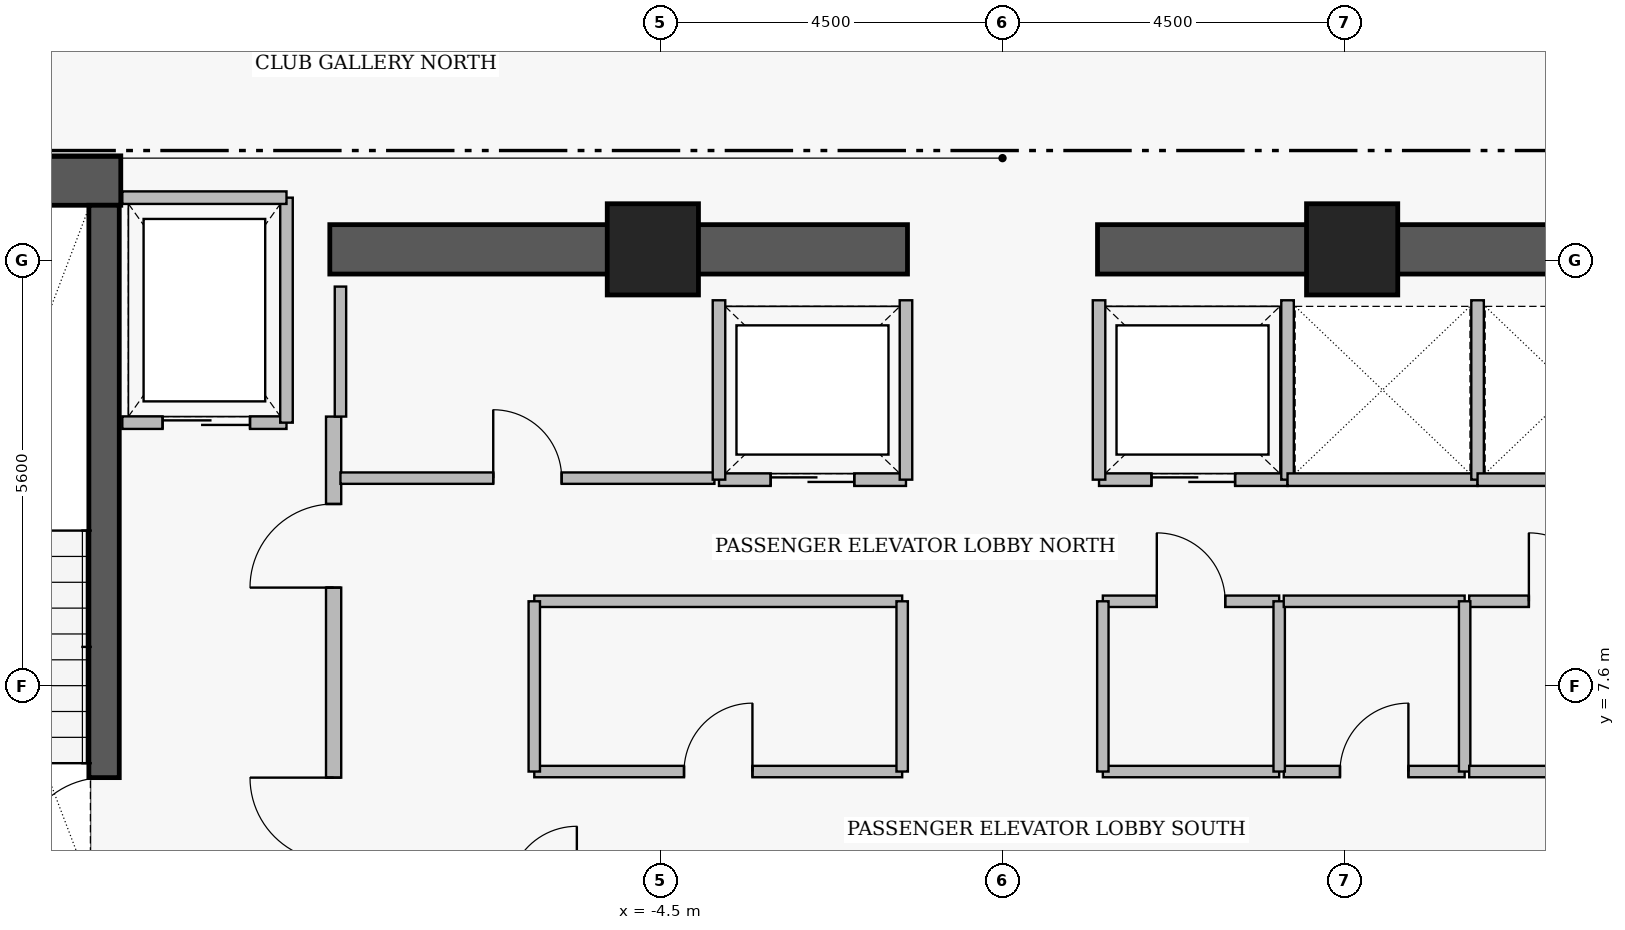
"""IFC4 building model, lengths in metres.
Left out: names, types, materials, properties, quantities, classifications, styles, units other than length and angle.
Written with IfcOpenShell. Run it as: python <this file> out.ifc"""

import sys

from ifc_helpers import new_model, si_unit, direction, frame, frame_2d, origin, origin_2d, place, context, subcontext, project, spatial, rectangle, extrude, element, fill, save


model = new_model("IFC4")
c1 = context("Model", 3, precision=1e-05, world=origin(), true_north=direction((0.0, 1.0)))
c2 = subcontext(c1, "Body", "Model", "MODEL_VIEW")
j1 = project(units=[si_unit("LENGTHUNIT", "METRE"), si_unit("PLANEANGLEUNIT", "RADIAN")], contexts=[c1])
p1 = place(None, origin())
s1 = spatial("IfcSite", under=j1, at=p1, CompositionType="ELEMENT")
p2 = place(p1, origin())
s2 = spatial("IfcBuilding", under=s1, at=p2, CompositionType="ELEMENT")
p3 = place(p2, frame((0.0, 0.0, 222.4)))
s3 = spatial("IfcBuildingStorey", under=s2, at=p3, CompositionType="ELEMENT", Elevation=222.4)
p4 = place(p3, frame((-16.06, 14.255, 0.0), z_axis=(0.0, 0.0, 1.0), x_axis=(1.0, 0.0, 0.0)))
e1 = element("IfcWall", 1, at=p4, inside=s3, PredefinedType="SHEAR", context=c2, shape_type="SweptSolid", body=[
    extrude(rectangle(XDim=4.46, YDim=0.65, at=frame_2d((2.23, 0.0))), origin(), (0.0, 0.0, 1.0), 3.56),
])
for number, where, z_axis, x_axis in (
    (2, (-8.85, 13.35, 0.0), (0.0, 0.0, 1.0), (1.0, 0.0, 0.0)),
    (3, (1.25, 13.35, 0.0), (0.0, 0.0, 1.0), (1.0, 0.0, 0.0)),
):
    element("IfcWall", number, at=place(p3, frame(where, z_axis=z_axis, x_axis=x_axis)), inside=s3, PredefinedType="SHEAR", context=c2, shape_type="SweptSolid", body=[
        extrude(rectangle(XDim=7.6, YDim=0.65, at=frame_2d((3.8, 0.0))), origin(), (0.0, 0.0, 1.0), 3.53),
    ])
p5 = place(p3, frame((-11.82, 4.97, 0.0), z_axis=(0.0, 0.0, 1.0), x_axis=(0.0, 1.0, 0.0)))
e4 = element("IfcWall", 4, at=p5, inside=s3, PredefinedType="SHEAR", context=c2, shape_type="SweptSolid", body=[
    extrude(rectangle(XDim=8.96, YDim=0.4, at=frame_2d((4.48, 0.0))), origin(), (0.0, 0.0, 1.0), 3.56),
])
p6 = place(p5, frame((0.31, 0.0, 0.0)))
e5 = element("IfcOpeningElement", 5, at=p6, cuts=e4, PredefinedType="OPENING", context=c2, shape_type="SweptSolid", body=[
    extrude(rectangle(XDim=1.12, YDim=2.22, at=frame_2d((0.56, 1.11))), frame((0.0, 0.21, 0.0), z_axis=(0.0, -1.0, 0.0), x_axis=(1.0, 0.0, 0.0)), (0.0, 0.0, 1.0), 0.42),
])
for number, where, z_axis, x_axis in (
    (6, (-4.6, 13.35, 0.0), (0.0, 0.0, 1.0), (1.0, 0.0, 0.0)),
    (7, (4.6, 13.35, 0.0), (0.0, 0.0, 1.0), (1.0, 0.0, 0.0)),
):
    element("IfcColumn", number, at=place(p3, frame(where, z_axis=z_axis, x_axis=x_axis)), inside=s3, PredefinedType="COLUMN", context=c2, shape_type="SweptSolid", body=[
        extrude(rectangle(XDim=1.2, YDim=1.2, at=origin_2d()), origin(), (0.0, 0.0, 1.0), 3.75),
    ])
p7 = place(p3, frame((-8.8, 5.05, 0.0), z_axis=(0.0, 0.0, 1.0), x_axis=(0.0, 1.0, 0.0)))
e8 = element("IfcWall", 8, at=p7, inside=s3, PredefinedType="PARTITIONING", context=c2, shape_type="SweptSolid", body=[
    extrude(rectangle(XDim=6.1, YDim=0.2, at=frame_2d((3.05, 0.0))), origin(), (0.0, 0.0, 1.0), 3.53),
])
p8 = place(p7, frame((0.25, 0.0, 0.0)))
e9 = element("IfcOpeningElement", 9, at=p8, cuts=e8, PredefinedType="OPENING", context=c2, shape_type="SweptSolid", body=[
    extrude(rectangle(XDim=1.1, YDim=2.2, at=frame_2d((0.55, 1.1))), frame((0.0, 0.11, 0.0), z_axis=(0.0, -1.0, 0.0), x_axis=(1.0, 0.0, 0.0)), (0.0, 0.0, 1.0), 0.22),
])
p9 = place(p7, frame((3.85, 0.0, 0.0)))
e10 = element("IfcOpeningElement", 10, at=p9, cuts=e8, PredefinedType="OPENING", context=c2, shape_type="SweptSolid", body=[
    extrude(rectangle(XDim=1.1, YDim=2.2, at=frame_2d((0.55, 1.1))), frame((0.0, 0.11, 0.0), z_axis=(0.0, -1.0, 0.0), x_axis=(1.0, 0.0, 0.0)), (0.0, 0.0, 1.0), 0.22),
])
p10 = place(p3, frame((-11.58, 11.07, 0.0), z_axis=(0.0, 0.0, 1.0), x_axis=(1.0, 0.0, 0.0)))
e11 = element("IfcWall", 11, at=p10, inside=s3, PredefinedType="PARTITIONING", context=c2, shape_type="SweptSolid", body=[
    extrude(rectangle(XDim=2.16, YDim=0.165, at=frame_2d((1.08, 0.0))), origin(), (0.0, 0.0, 1.0), 3.53),
])
p11 = place(p10, frame((0.53, 0.0, 0.0)))
e12 = element("IfcOpeningElement", 12, at=p11, cuts=e11, PredefinedType="OPENING", context=c2, shape_type="SweptSolid", body=[
    extrude(rectangle(XDim=1.15, YDim=2.25, at=frame_2d((0.575, 1.125))), frame((0.0, 0.093, 0.0), z_axis=(0.0, -1.0, 0.0), x_axis=(1.0, 0.0, 0.0)), (0.0, 0.0, 1.0), 0.185),
])
p12 = place(p3, frame((-3.73, 10.32, 0.0), z_axis=(0.0, 0.0, 1.0), x_axis=(1.0, 0.0, 0.0)))
e13 = element("IfcWall", 13, at=p12, inside=s3, PredefinedType="PARTITIONING", context=c2, shape_type="SweptSolid", body=[
    extrude(rectangle(XDim=2.46, YDim=0.165, at=frame_2d((1.23, 0.0))), origin(), (0.0, 0.0, 1.0), 3.53),
])
p13 = place(p12, frame((0.68, 0.0, 0.0)))
e14 = element("IfcOpeningElement", 14, at=p13, cuts=e13, PredefinedType="OPENING", context=c2, shape_type="SweptSolid", body=[
    extrude(rectangle(XDim=1.1, YDim=2.25, at=frame_2d((0.55, 1.125))), frame((0.0, 0.093, 0.0), z_axis=(0.0, -1.0, 0.0), x_axis=(1.0, 0.0, 0.0)), (0.0, 0.0, 1.0), 0.185),
])
p14 = place(p3, frame((1.27, 10.32, 0.0), z_axis=(0.0, 0.0, 1.0), x_axis=(1.0, 0.0, 0.0)))
e15 = element("IfcWall", 15, at=p14, inside=s3, PredefinedType="PARTITIONING", context=c2, shape_type="SweptSolid", body=[
    extrude(rectangle(XDim=2.48, YDim=0.165, at=frame_2d((1.24, 0.0))), origin(), (0.0, 0.0, 1.0), 3.53),
])
p15 = place(p14, frame((0.69, 0.0, 0.0)))
e16 = element("IfcOpeningElement", 16, at=p15, cuts=e15, PredefinedType="OPENING", context=c2, shape_type="SweptSolid", body=[
    extrude(rectangle(XDim=1.1, YDim=2.25, at=frame_2d((0.55, 1.125))), frame((0.0, 0.093, 0.0), z_axis=(0.0, -1.0, 0.0), x_axis=(1.0, 0.0, 0.0)), (0.0, 0.0, 1.0), 0.185),
])
p16 = place(p3, frame((-8.71, 10.34, 0.0), z_axis=(0.0, 0.0, 1.0), x_axis=(1.0, 0.0, 0.0)))
e17 = element("IfcWall", 17, at=p16, inside=s3, PredefinedType="PARTITIONING", context=c2, shape_type="SweptSolid", body=[
    extrude(rectangle(XDim=4.92, YDim=0.15, at=frame_2d((2.46, 0.0))), origin(), (0.0, 0.0, 1.0), 3.53),
])
p17 = place(p16, frame((2.01, 0.0, 0.0)))
e18 = element("IfcOpeningElement", 18, at=p17, cuts=e17, PredefinedType="OPENING", context=c2, shape_type="SweptSolid", body=[
    extrude(rectangle(XDim=0.9, YDim=2.15, at=frame_2d((0.45, 1.075))), frame((0.0, 0.085, 0.0), z_axis=(0.0, -1.0, 0.0), x_axis=(1.0, 0.0, 0.0)), (0.0, 0.0, 1.0), 0.17),
])
p18 = place(p3, frame((-6.16, 6.48, 0.0), z_axis=(0.0, 0.0, 1.0), x_axis=(1.0, 0.0, 0.0)))
e19 = element("IfcWall", 19, at=p18, inside=s3, PredefinedType="PARTITIONING", context=c2, shape_type="SweptSolid", body=[
    extrude(rectangle(XDim=4.84, YDim=0.15, at=frame_2d((2.42, 0.0))), origin(), (0.0, 0.0, 1.0), 3.53),
])
p19 = place(p18, frame((1.97, 0.0, 0.0)))
e20 = element("IfcOpeningElement", 20, at=p19, cuts=e19, PredefinedType="OPENING", context=c2, shape_type="SweptSolid", body=[
    extrude(rectangle(XDim=0.9, YDim=2.15, at=frame_2d((0.45, 1.075))), frame((0.0, 0.085, 0.0), z_axis=(0.0, -1.0, 0.0), x_axis=(1.0, 0.0, 0.0)), (0.0, 0.0, 1.0), 0.17),
])
p20 = place(p3, frame((1.32, 8.72, 0.0), z_axis=(0.0, 0.0, 1.0), x_axis=(1.0, 0.0, 0.0)))
e21 = element("IfcWall", 21, at=p20, inside=s3, PredefinedType="PARTITIONING", context=c2, shape_type="SweptSolid", body=[
    extrude(rectangle(XDim=2.32, YDim=0.15, at=frame_2d((1.16, 0.0))), origin(), (0.0, 0.0, 1.0), 3.53),
])
p21 = place(p20, frame((0.71, 0.0, 0.0)))
e22 = element("IfcOpeningElement", 22, at=p21, cuts=e21, PredefinedType="OPENING", context=c2, shape_type="SweptSolid", body=[
    extrude(rectangle(XDim=0.9, YDim=2.15, at=frame_2d((0.45, 1.075))), frame((0.0, 0.085, 0.0), z_axis=(0.0, -1.0, 0.0), x_axis=(1.0, 0.0, 0.0)), (0.0, 0.0, 1.0), 0.17),
])
p22 = place(p3, frame((3.7, 6.48, 0.0), z_axis=(0.0, 0.0, 1.0), x_axis=(1.0, 0.0, 0.0)))
e23 = element("IfcWall", 23, at=p22, inside=s3, PredefinedType="PARTITIONING", context=c2, shape_type="SweptSolid", body=[
    extrude(rectangle(XDim=2.38, YDim=0.15, at=frame_2d((1.19, 0.0))), origin(), (0.0, 0.0, 1.0), 3.53),
])
p23 = place(p22, frame((0.74, 0.0, 0.0)))
e24 = element("IfcOpeningElement", 24, at=p23, cuts=e23, PredefinedType="OPENING", context=c2, shape_type="SweptSolid", body=[
    extrude(rectangle(XDim=0.9, YDim=2.15, at=frame_2d((0.45, 1.075))), frame((0.0, 0.085, 0.0), z_axis=(0.0, -1.0, 0.0), x_axis=(1.0, 0.0, 0.0)), (0.0, 0.0, 1.0), 0.17),
])
p24 = place(p3, frame((6.14, 8.72, 0.0), z_axis=(0.0, 0.0, 1.0), x_axis=(1.0, 0.0, 0.0)))
e25 = element("IfcWall", 25, at=p24, inside=s3, PredefinedType="PARTITIONING", context=c2, shape_type="SweptSolid", body=[
    extrude(rectangle(XDim=2.47, YDim=0.15, at=frame_2d((1.235, 0.0))), origin(), (0.0, 0.0, 1.0), 3.53),
])
p25 = place(p24, frame((0.785, 0.0, 0.0)))
e26 = element("IfcOpeningElement", 26, at=p25, cuts=e25, PredefinedType="OPENING", context=c2, shape_type="SweptSolid", body=[
    extrude(rectangle(XDim=0.9, YDim=2.15, at=frame_2d((0.45, 1.075))), frame((0.0, 0.085, 0.0), z_axis=(0.0, -1.0, 0.0), x_axis=(1.0, 0.0, 0.0)), (0.0, 0.0, 1.0), 0.17),
])
p26 = place(p3, frame((-9.42, 11.07, 0.0), z_axis=(0.0, 0.0, 1.0), x_axis=(0.0, 1.0, 0.0)))
e27 = element("IfcWall", 27, at=p26, inside=s3, PredefinedType="PARTITIONING", context=c2, shape_type="SweptSolid", body=[
    extrude(rectangle(XDim=2.96, YDim=0.165, at=frame_2d((1.48, 0.0))), origin(), (0.0, 0.0, 1.0), 3.53),
])
p27 = place(p3, frame((-11.58, 14.03, 0.0), z_axis=(0.0, 0.0, 1.0), x_axis=(1.0, 0.0, 0.0)))
e28 = element("IfcWall", 28, at=p27, inside=s3, PredefinedType="PARTITIONING", context=c2, shape_type="SweptSolid", body=[
    extrude(rectangle(XDim=2.16, YDim=0.165, at=frame_2d((1.08, 0.0))), origin(), (0.0, 0.0, 1.0), 3.53),
])
for number, where, z_axis, x_axis in (
    (29, (-3.73, 10.32, 0.0), (0.0, 0.0, 1.0), (0.0, 1.0, 0.0)),
    (30, (-1.27, 10.32, 0.0), (0.0, 0.0, 1.0), (0.0, 1.0, 0.0)),
    (31, (1.27, 10.32, 0.0), (0.0, 0.0, 1.0), (0.0, 1.0, 0.0)),
    (32, (3.75, 10.32, 0.0), (0.0, 0.0, 1.0), (0.0, 1.0, 0.0)),
):
    element("IfcWall", number, at=place(p3, frame(where, z_axis=z_axis, x_axis=x_axis)), inside=s3, PredefinedType="PARTITIONING", context=c2, shape_type="SweptSolid", body=[
        extrude(rectangle(XDim=2.36, YDim=0.165, at=frame_2d((1.18, 0.0))), origin(), (0.0, 0.0, 1.0), 3.53),
    ])
p28 = place(p3, frame((3.75, 10.32, 0.0), z_axis=(0.0, 0.0, 1.0), x_axis=(1.0, 0.0, 0.0)))
e33 = element("IfcWall", 33, at=p28, inside=s3, PredefinedType="PARTITIONING", context=c2, shape_type="SweptSolid", body=[
    extrude(rectangle(XDim=2.5, YDim=0.165, at=frame_2d((1.25, 0.0))), origin(), (0.0, 0.0, 1.0), 3.53),
])
p29 = place(p3, frame((6.25, 10.32, 0.0), z_axis=(0.0, 0.0, 1.0), x_axis=(0.0, 1.0, 0.0)))
e34 = element("IfcWall", 34, at=p29, inside=s3, PredefinedType="PARTITIONING", context=c2, shape_type="SweptSolid", body=[
    extrude(rectangle(XDim=2.36, YDim=0.165, at=frame_2d((1.18, 0.0))), origin(), (0.0, 0.0, 1.0), 3.53),
])
p30 = place(p3, frame((6.25, 10.32, 0.0), z_axis=(0.0, 0.0, 1.0), x_axis=(1.0, 0.0, 0.0)))
e35 = element("IfcWall", 35, at=p30, inside=s3, PredefinedType="PARTITIONING", context=c2, shape_type="SweptSolid", body=[
    extrude(rectangle(XDim=2.48, YDim=0.165, at=frame_2d((1.24, 0.0))), origin(), (0.0, 0.0, 1.0), 3.53),
])
p31 = place(p3, frame((-8.71, 11.15, 0.0), z_axis=(0.0, 0.0, 1.0), x_axis=(0.0, 1.0, 0.0)))
e36 = element("IfcWall", 36, at=p31, inside=s3, PredefinedType="PARTITIONING", context=c2, shape_type="SweptSolid", body=[
    extrude(rectangle(XDim=1.71, YDim=0.15, at=frame_2d((0.855, 0.0))), origin(), (0.0, 0.0, 1.0), 3.53),
])
p32 = place(p3, frame((-6.16, 8.72, 0.0), z_axis=(0.0, 0.0, 1.0), x_axis=(1.0, 0.0, 0.0)))
e37 = element("IfcWall", 37, at=p32, inside=s3, PredefinedType="PARTITIONING", context=c2, shape_type="SweptSolid", body=[
    extrude(rectangle(XDim=4.84, YDim=0.15, at=frame_2d((2.42, 0.0))), origin(), (0.0, 0.0, 1.0), 3.53),
])
for number, where, z_axis, x_axis in (
    (38, (-6.16, 6.48, 0.0), (0.0, 0.0, 1.0), (0.0, 1.0, 0.0)),
    (39, (-1.32, 6.48, 0.0), (0.0, 0.0, 1.0), (0.0, 1.0, 0.0)),
):
    element("IfcWall", number, at=place(p3, frame(where, z_axis=z_axis, x_axis=x_axis)), inside=s3, PredefinedType="PARTITIONING", context=c2, shape_type="SweptSolid", body=[
        extrude(rectangle(XDim=2.24, YDim=0.15, at=frame_2d((1.12, 0.0))), origin(), (0.0, 0.0, 1.0), 3.53),
    ])
p33 = place(p3, frame((1.32, 6.48, 0.0), z_axis=(0.0, 0.0, 1.0), x_axis=(1.0, 0.0, 0.0)))
e40 = element("IfcWall", 40, at=p33, inside=s3, PredefinedType="PARTITIONING", context=c2, shape_type="SweptSolid", body=[
    extrude(rectangle(XDim=2.32, YDim=0.15, at=frame_2d((1.16, 0.0))), origin(), (0.0, 0.0, 1.0), 3.53),
])
for number, where, z_axis, x_axis in (
    (41, (1.32, 6.48, 0.0), (0.0, 0.0, 1.0), (0.0, 1.0, 0.0)),
    (42, (3.64, 6.48, 0.0), (0.0, 0.0, 1.0), (0.0, 1.0, 0.0)),
):
    element("IfcWall", number, at=place(p3, frame(where, z_axis=z_axis, x_axis=x_axis)), inside=s3, PredefinedType="PARTITIONING", context=c2, shape_type="SweptSolid", body=[
        extrude(rectangle(XDim=2.24, YDim=0.15, at=frame_2d((1.12, 0.0))), origin(), (0.0, 0.0, 1.0), 3.53),
    ])
p34 = place(p3, frame((3.7, 8.72, 0.0), z_axis=(0.0, 0.0, 1.0), x_axis=(1.0, 0.0, 0.0)))
e43 = element("IfcWall", 43, at=p34, inside=s3, PredefinedType="PARTITIONING", context=c2, shape_type="SweptSolid", body=[
    extrude(rectangle(XDim=2.38, YDim=0.15, at=frame_2d((1.19, 0.0))), origin(), (0.0, 0.0, 1.0), 3.53),
])
p35 = place(p3, frame((6.08, 6.48, 0.0), z_axis=(0.0, 0.0, 1.0), x_axis=(0.0, 1.0, 0.0)))
e44 = element("IfcWall", 44, at=p35, inside=s3, PredefinedType="PARTITIONING", context=c2, shape_type="SweptSolid", body=[
    extrude(rectangle(XDim=2.24, YDim=0.15, at=frame_2d((1.12, 0.0))), origin(), (0.0, 0.0, 1.0), 3.53),
])
p36 = place(p3, frame((6.14, 6.48, 0.0), z_axis=(0.0, 0.0, 1.0), x_axis=(1.0, 0.0, 0.0)))
e45 = element("IfcWall", 45, at=p36, inside=s3, PredefinedType="PARTITIONING", context=c2, shape_type="SweptSolid", body=[
    extrude(rectangle(XDim=2.47, YDim=0.15, at=frame_2d((1.235, 0.0))), origin(), (0.0, 0.0, 1.0), 3.53),
])
p37 = place(p6, origin())
e46 = element("IfcDoor", 46, at=p37, inside=s3, OperationType="SINGLE_SWING_LEFT", PredefinedType="DOOR", context=c2, shape_type="SweptSolid", body=[
    extrude(rectangle(XDim=1.12, YDim=2.22, at=frame_2d((0.56, 1.11))), frame((0.0, 0.025, 0.0), z_axis=(0.0, -1.0, 0.0), x_axis=(1.0, 0.0, 0.0)), (0.0, 0.0, 1.0), 0.05),
])
fill(e5, e46)
p38 = place(p8, origin())
e47 = element("IfcDoor", 47, at=p38, inside=s3, OperationType="SINGLE_SWING_RIGHT", PredefinedType="DOOR", context=c2, shape_type="SweptSolid", body=[
    extrude(rectangle(XDim=1.1, YDim=2.2, at=frame_2d((0.55, 1.1))), frame((0.0, 0.025, 0.0), z_axis=(0.0, -1.0, 0.0), x_axis=(1.0, 0.0, 0.0)), (0.0, 0.0, 1.0), 0.05),
])
fill(e9, e47)
p39 = place(p9, origin())
e48 = element("IfcDoor", 48, at=p39, inside=s3, OperationType="SINGLE_SWING_LEFT", PredefinedType="DOOR", context=c2, shape_type="SweptSolid", body=[
    extrude(rectangle(XDim=1.1, YDim=2.2, at=frame_2d((0.55, 1.1))), frame((0.0, 0.025, 0.0), z_axis=(0.0, -1.0, 0.0), x_axis=(1.0, 0.0, 0.0)), (0.0, 0.0, 1.0), 0.05),
])
fill(e10, e48)
p40 = place(p11, origin())
e49 = element("IfcDoor", 49, at=p40, inside=s3, OperationType="SLIDING_TO_LEFT", PredefinedType="DOOR", context=c2, shape_type="SweptSolid", body=[
    extrude(rectangle(XDim=1.15, YDim=2.25, at=frame_2d((0.575, 1.125))), frame((0.0, 0.025, 0.0), z_axis=(0.0, -1.0, 0.0), x_axis=(1.0, 0.0, 0.0)), (0.0, 0.0, 1.0), 0.05),
])
fill(e12, e49)
p41 = place(p13, origin())
e50 = element("IfcDoor", 50, at=p41, inside=s3, OperationType="SLIDING_TO_LEFT", PredefinedType="DOOR", context=c2, shape_type="SweptSolid", body=[
    extrude(rectangle(XDim=1.1, YDim=2.25, at=frame_2d((0.55, 1.125))), frame((0.0, 0.025, 0.0), z_axis=(0.0, -1.0, 0.0), x_axis=(1.0, 0.0, 0.0)), (0.0, 0.0, 1.0), 0.05),
])
fill(e14, e50)
p42 = place(p15, origin())
e51 = element("IfcDoor", 51, at=p42, inside=s3, OperationType="SLIDING_TO_LEFT", PredefinedType="DOOR", context=c2, shape_type="SweptSolid", body=[
    extrude(rectangle(XDim=1.1, YDim=2.25, at=frame_2d((0.55, 1.125))), frame((0.0, 0.025, 0.0), z_axis=(0.0, -1.0, 0.0), x_axis=(1.0, 0.0, 0.0)), (0.0, 0.0, 1.0), 0.05),
])
fill(e16, e51)
p43 = place(p17, origin())
e52 = element("IfcDoor", 52, at=p43, inside=s3, OperationType="SINGLE_SWING_LEFT", PredefinedType="DOOR", context=c2, shape_type="SweptSolid", body=[
    extrude(rectangle(XDim=0.9, YDim=2.15, at=frame_2d((0.45, 1.075))), frame((0.0, 0.025, 0.0), z_axis=(0.0, -1.0, 0.0), x_axis=(1.0, 0.0, 0.0)), (0.0, 0.0, 1.0), 0.05),
])
fill(e18, e52)
p44 = place(p19, origin())
e53 = element("IfcDoor", 53, at=p44, inside=s3, OperationType="SINGLE_SWING_RIGHT", PredefinedType="DOOR", context=c2, shape_type="SweptSolid", body=[
    extrude(rectangle(XDim=0.9, YDim=2.15, at=frame_2d((0.45, 1.075))), frame((0.0, 0.025, 0.0), z_axis=(0.0, -1.0, 0.0), x_axis=(1.0, 0.0, 0.0)), (0.0, 0.0, 1.0), 0.05),
])
fill(e20, e53)
p45 = place(p21, origin())
e54 = element("IfcDoor", 54, at=p45, inside=s3, OperationType="SINGLE_SWING_LEFT", PredefinedType="DOOR", context=c2, shape_type="SweptSolid", body=[
    extrude(rectangle(XDim=0.9, YDim=2.15, at=frame_2d((0.45, 1.075))), frame((0.0, 0.025, 0.0), z_axis=(0.0, -1.0, 0.0), x_axis=(1.0, 0.0, 0.0)), (0.0, 0.0, 1.0), 0.05),
])
fill(e22, e54)
p46 = place(p23, origin())
e55 = element("IfcDoor", 55, at=p46, inside=s3, OperationType="SINGLE_SWING_RIGHT", PredefinedType="DOOR", context=c2, shape_type="SweptSolid", body=[
    extrude(rectangle(XDim=0.9, YDim=2.15, at=frame_2d((0.45, 1.075))), frame((0.0, 0.025, 0.0), z_axis=(0.0, -1.0, 0.0), x_axis=(1.0, 0.0, 0.0)), (0.0, 0.0, 1.0), 0.05),
])
fill(e24, e55)
p47 = place(p25, origin())
e56 = element("IfcDoor", 56, at=p47, inside=s3, OperationType="SINGLE_SWING_LEFT", PredefinedType="DOOR", context=c2, shape_type="SweptSolid", body=[
    extrude(rectangle(XDim=0.9, YDim=2.15, at=frame_2d((0.45, 1.075))), frame((0.0, 0.025, 0.0), z_axis=(0.0, -1.0, 0.0), x_axis=(1.0, 0.0, 0.0)), (0.0, 0.0, 1.0), 0.05),
])
fill(e26, e56)
save(model, sys.argv[1])
